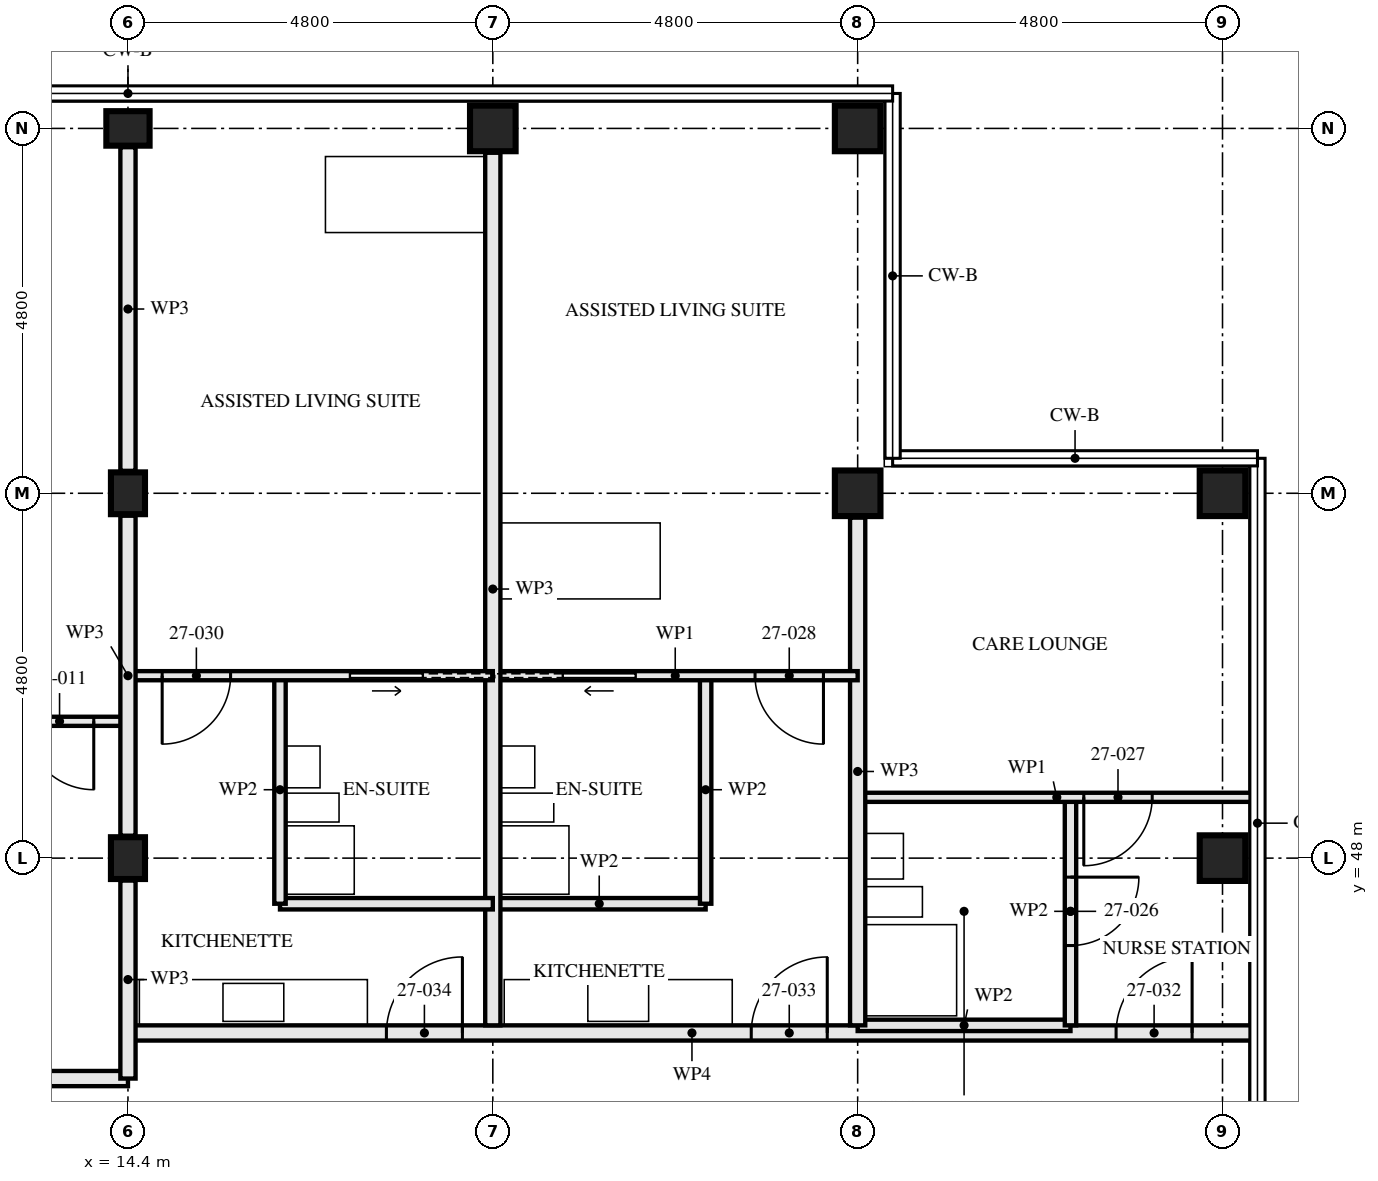
"""IFC4 building model, lengths in metres.
Left out: names, types, materials, properties, quantities, classifications, styles, units other than length and angle.
Written with IfcOpenShell. Run it as: python <this file> out.ifc"""

import sys

from ifc_helpers import new_model, si_unit, direction, frame, frame_2d, origin, origin_2d, place, context, subcontext, project, spatial, rectangle, hollow_rectangle, i_section, extrude, element, fill, save


model = new_model("IFC4")
c1 = context("Model", 3, precision=1e-05, world=origin(), true_north=direction((0.0, 1.0)))
c2 = subcontext(c1, "Body", "Model", "MODEL_VIEW")
j1 = project(units=[si_unit("LENGTHUNIT", "METRE"), si_unit("PLANEANGLEUNIT", "RADIAN")], contexts=[c1])
p1 = place(None, origin())
s1 = spatial("IfcSite", under=j1, at=p1, CompositionType="ELEMENT")
p2 = place(p1, origin())
s2 = spatial("IfcBuilding", under=s1, at=p2, CompositionType="ELEMENT")
p3 = place(p2, frame((0.0, 0.0, 101.5)))
s3 = spatial("IfcBuildingStorey", under=s2, at=p3, CompositionType="ELEMENT", Elevation=101.5)
for number, where, z_axis, x_axis in (
    (1, (14.4, 48.0, 0.0), (0.0, 0.0, 1.0), (1.0, 0.0, 0.0)),
    (2, (14.4, 52.8, 0.0), (0.0, 0.0, 1.0), (1.0, 0.0, 0.0)),
):
    element("IfcColumn", number, at=place(p3, frame(where, z_axis=z_axis, x_axis=x_axis)), inside=s3, PredefinedType="COLUMN", context=c2, shape_type="SweptSolid", body=[
        extrude(i_section(OverallWidth=0.448, OverallDepth=0.55, WebThickness=0.072, FlangeThickness=0.115, FilletRadius=0.015, at=origin_2d()), origin(), (0.0, 0.0, 1.0), 3.5),
    ])
p4 = place(p3, frame((14.4, 57.6, 0.0), z_axis=(0.0, 0.0, 1.0), x_axis=(0.0, 1.0, 0.0)))
e3 = element("IfcColumn", 3, at=p4, inside=s3, PredefinedType="COLUMN", context=c2, shape_type="SweptSolid", body=[
    extrude(i_section(OverallWidth=0.454, OverallDepth=0.569, WebThickness=0.078, FlangeThickness=0.125, FilletRadius=0.015, at=origin_2d()), origin(), (0.0, 0.0, 1.0), 3.5),
])
for number, where, z_axis, x_axis in (
    (4, (19.2, 57.6, 0.0), (0.0, 0.0, 1.0), (0.0, 1.0, 0.0)),
    (5, (24.0, 52.8, 0.0), (0.0, 0.0, 1.0), (0.0, 1.0, 0.0)),
    (6, (24.0, 57.6, 0.0), (0.0, 0.0, 1.0), (0.0, 1.0, 0.0)),
):
    element("IfcColumn", number, at=place(p3, frame(where, z_axis=z_axis, x_axis=x_axis)), inside=s3, PredefinedType="COLUMN", context=c2, shape_type="SweptSolid", body=[
        extrude(hollow_rectangle(XDim=0.6, YDim=0.6, WallThickness=0.06, at=origin_2d()), origin(), (0.0, 0.0, 1.0), 3.5),
    ])
p5 = place(p3, frame((28.8, 48.0, 0.0), z_axis=(0.0, 0.0, 1.0), x_axis=(1.0, 0.0, 0.0)))
e7 = element("IfcColumn", 7, at=p5, inside=s3, PredefinedType="COLUMN", context=c2, shape_type="SweptSolid", body=[
    extrude(hollow_rectangle(XDim=0.6, YDim=0.6, WallThickness=0.08, at=origin_2d()), origin(), (0.0, 0.0, 1.0), 3.5),
])
p6 = place(p3, frame((28.8, 52.8, 0.0), z_axis=(0.0, 0.0, 1.0), x_axis=(0.0, 1.0, 0.0)))
e8 = element("IfcColumn", 8, at=p6, inside=s3, PredefinedType="COLUMN", context=c2, shape_type="SweptSolid", body=[
    extrude(hollow_rectangle(XDim=0.6, YDim=0.6, WallThickness=0.06, at=origin_2d()), origin(), (0.0, 0.0, 1.0), 3.5),
])
p7 = place(p3, frame((14.4, 49.8, 0.0), z_axis=(0.0, 0.0, 1.0), x_axis=(-1.0, 0.0, 0.0)))
e9 = element("IfcWall", 9, at=p7, inside=s3, PredefinedType="PARTITIONING", context=c2, shape_type="SweptSolid", body=[
    extrude(rectangle(XDim=4.8, YDim=0.12, at=frame_2d((2.4, 0.0))), origin(), (0.0, 0.0, 1.0), 3.33),
])
p8 = place(p7, frame((0.45, 0.0, 0.0)))
e10 = element("IfcOpeningElement", 10, at=p8, cuts=e9, PredefinedType="OPENING", context=c2, shape_type="SweptSolid", body=[
    extrude(rectangle(XDim=0.9, YDim=2.1, at=frame_2d((0.45, 1.05))), frame((0.0, 0.071, 0.0), z_axis=(0.0, -1.0, 0.0), x_axis=(1.0, 0.0, 0.0)), (0.0, 0.0, 1.0), 0.141),
])
p9 = place(p3, frame((14.4, 45.1, 0.0), z_axis=(0.0, 0.0, 1.0), x_axis=(-1.0, 0.0, 0.0)))
e11 = element("IfcWall", 11, at=p9, inside=s3, PredefinedType="PARTITIONING", context=c2, shape_type="SweptSolid", body=[
    extrude(rectangle(XDim=9.6, YDim=0.2, at=frame_2d((4.8, 0.0))), origin(), (0.0, 0.0, 1.0), 3.33),
])
p10 = place(p9, frame((5.2, 0.0, 0.0)))
e12 = element("IfcOpeningElement", 12, at=p10, cuts=e11, PredefinedType="OPENING", context=c2, shape_type="SweptSolid", body=[
    extrude(rectangle(XDim=1.0, YDim=2.1, at=frame_2d((0.5, 1.05))), frame((0.0, 0.111, 0.0), z_axis=(0.0, -1.0, 0.0), x_axis=(1.0, 0.0, 0.0)), (0.0, 0.0, 1.0), 0.221),
])
p11 = place(p3, frame((26.8, 48.8, 0.0), z_axis=(0.0, 0.0, 1.0), x_axis=(0.0, -1.0, 0.0)))
e13 = element("IfcWall", 13, at=p11, inside=s3, PredefinedType="PARTITIONING", context=c2, shape_type="SweptSolid", body=[
    extrude(rectangle(XDim=3.0, YDim=0.15, at=frame_2d((1.5, 0.0))), origin(), (0.0, 0.0, 1.0), 2.55),
])
p12 = place(p11, frame((1.05, 0.0, 0.0)))
e14 = element("IfcOpeningElement", 14, at=p12, cuts=e13, PredefinedType="OPENING", context=c2, shape_type="SweptSolid", body=[
    extrude(rectangle(XDim=0.9, YDim=2.1, at=frame_2d((0.45, 1.05))), frame((0.0, 0.085, 0.0), z_axis=(0.0, -1.0, 0.0), x_axis=(1.0, 0.0, 0.0)), (0.0, 0.0, 1.0), 0.171),
])
p13 = place(p3, frame((26.8, 45.8, 0.0), z_axis=(0.0, 0.0, 1.0), x_axis=(-1.0, 0.0, 0.0)))
e15 = element("IfcWall", 15, at=p13, inside=s3, PredefinedType="PARTITIONING", context=c2, shape_type="SweptSolid", body=[
    extrude(rectangle(XDim=2.8, YDim=0.15, at=frame_2d((1.4, 0.0))), origin(), (0.0, 0.0, 1.0), 3.33),
])
p14 = place(p3, frame((29.24, 48.8, 0.0), z_axis=(0.0, 0.0, 1.0), x_axis=(-1.0, 0.0, 0.0)))
e16 = element("IfcWall", 16, at=p14, inside=s3, PredefinedType="PARTITIONING", context=c2, shape_type="SweptSolid", body=[
    extrude(rectangle(XDim=5.24, YDim=0.12, at=frame_2d((2.62, 0.0))), origin(), (0.0, 0.0, 1.0), 2.32),
])
p15 = place(p14, frame((1.365, 0.0, 0.0)))
e17 = element("IfcOpeningElement", 17, at=p15, cuts=e16, PredefinedType="OPENING", context=c2, shape_type="SweptSolid", body=[
    extrude(rectangle(XDim=0.9, YDim=2.1, at=frame_2d((0.45, 1.05))), frame((0.0, 0.071, 0.0), z_axis=(0.0, -1.0, 0.0), x_axis=(1.0, 0.0, 0.0)), (0.0, 0.0, 1.0), 0.141),
])
p16 = place(p3, frame((24.0, 52.48, 0.0), z_axis=(0.0, 0.0, 1.0), x_axis=(0.0, -1.0, 0.0)))
e18 = element("IfcWall", 18, at=p16, inside=s3, PredefinedType="PARTITIONING", context=c2, shape_type="SweptSolid", body=[
    extrude(rectangle(XDim=6.68, YDim=0.2, at=frame_2d((3.34, 0.0))), origin(), (0.0, 0.0, 1.0), 2.55),
])
p17 = place(p3, frame((22.0, 50.4, 0.0), z_axis=(0.0, 0.0, 1.0), x_axis=(0.0, -1.0, 0.0)))
e19 = element("IfcWall", 19, at=p17, inside=s3, PredefinedType="PARTITIONING", context=c2, shape_type="SweptSolid", body=[
    extrude(rectangle(XDim=3.0, YDim=0.15, at=frame_2d((1.5, 0.0))), origin(), (0.0, 0.0, 1.0), 2.55),
])
p18 = place(p3, frame((22.0, 47.4, 0.0), z_axis=(0.0, 0.0, 1.0), x_axis=(-1.0, 0.0, 0.0)))
e20 = element("IfcWall", 20, at=p18, inside=s3, PredefinedType="PARTITIONING", context=c2, shape_type="SweptSolid", body=[
    extrude(rectangle(XDim=2.8, YDim=0.15, at=frame_2d((1.4, 0.0))), origin(), (0.0, 0.0, 1.0), 3.33),
])
p19 = place(p3, frame((24.0, 50.4, 0.0), z_axis=(0.0, 0.0, 1.0), x_axis=(-1.0, 0.0, 0.0)))
e21 = element("IfcWall", 21, at=p19, inside=s3, PredefinedType="PARTITIONING", context=c2, shape_type="SweptSolid", body=[
    extrude(rectangle(XDim=4.8, YDim=0.12, at=frame_2d((2.4, 0.0))), origin(), (0.0, 0.0, 1.0), 3.33),
])
p20 = place(p19, frame((0.45, 0.0, 0.0)))
e22 = element("IfcOpeningElement", 22, at=p20, cuts=e21, PredefinedType="OPENING", context=c2, shape_type="SweptSolid", body=[
    extrude(rectangle(XDim=0.9, YDim=2.1, at=frame_2d((0.45, 1.05))), frame((0.0, 0.071, 0.0), z_axis=(0.0, -1.0, 0.0), x_axis=(1.0, 0.0, 0.0)), (0.0, 0.0, 1.0), 0.141),
])
p21 = place(p19, frame((2.925, 0.0, 0.0)))
e23 = element("IfcOpeningElement", 23, at=p21, cuts=e21, PredefinedType="OPENING", context=c2, shape_type="SweptSolid", body=[
    extrude(rectangle(XDim=0.95, YDim=2.1, at=frame_2d((0.475, 1.05))), frame((0.0, 0.071, 0.0), z_axis=(0.0, -1.0, 0.0), x_axis=(1.0, 0.0, 0.0)), (0.0, 0.0, 1.0), 0.141),
])
p22 = place(p3, frame((19.2, 57.28, 0.0), z_axis=(0.0, 0.0, 1.0), x_axis=(0.0, -1.0, 0.0)))
e24 = element("IfcWall", 24, at=p22, inside=s3, PredefinedType="PARTITIONING", context=c2, shape_type="SweptSolid", body=[
    extrude(rectangle(XDim=11.48, YDim=0.2, at=frame_2d((5.74, 0.0))), origin(), (0.0, 0.0, 1.0), 2.55),
])
p23 = place(p3, frame((16.4, 50.4, 0.0), z_axis=(0.0, 0.0, 1.0), x_axis=(0.0, -1.0, 0.0)))
e25 = element("IfcWall", 25, at=p23, inside=s3, PredefinedType="PARTITIONING", context=c2, shape_type="SweptSolid", body=[
    extrude(rectangle(XDim=3.0, YDim=0.15, at=frame_2d((1.5, 0.0))), origin(), (0.0, 0.0, 1.0), 2.55),
])
p24 = place(p3, frame((19.2, 47.4, 0.0), z_axis=(0.0, 0.0, 1.0), x_axis=(-1.0, 0.0, 0.0)))
e26 = element("IfcWall", 26, at=p24, inside=s3, PredefinedType="PARTITIONING", context=c2, shape_type="SweptSolid", body=[
    extrude(rectangle(XDim=2.8, YDim=0.15, at=frame_2d((1.4, 0.0))), origin(), (0.0, 0.0, 1.0), 3.33),
])
p25 = place(p3, frame((19.2, 50.4, 0.0), z_axis=(0.0, 0.0, 1.0), x_axis=(-1.0, 0.0, 0.0)))
e27 = element("IfcWall", 27, at=p25, inside=s3, PredefinedType="PARTITIONING", context=c2, shape_type="SweptSolid", body=[
    extrude(rectangle(XDim=4.8, YDim=0.12, at=frame_2d((2.4, 0.0))), origin(), (0.0, 0.0, 1.0), 3.33),
])
p26 = place(p25, frame((3.45, 0.0, 0.0)))
e28 = element("IfcOpeningElement", 28, at=p26, cuts=e27, PredefinedType="OPENING", context=c2, shape_type="SweptSolid", body=[
    extrude(rectangle(XDim=0.9, YDim=2.1, at=frame_2d((0.45, 1.05))), frame((0.0, 0.071, 0.0), z_axis=(0.0, -1.0, 0.0), x_axis=(1.0, 0.0, 0.0)), (0.0, 0.0, 1.0), 0.141),
])
p27 = place(p25, frame((0.925, 0.0, 0.0)))
e29 = element("IfcOpeningElement", 29, at=p27, cuts=e27, PredefinedType="OPENING", context=c2, shape_type="SweptSolid", body=[
    extrude(rectangle(XDim=0.95, YDim=2.1, at=frame_2d((0.475, 1.05))), frame((0.0, 0.071, 0.0), z_axis=(0.0, -1.0, 0.0), x_axis=(1.0, 0.0, 0.0)), (0.0, 0.0, 1.0), 0.141),
])
p28 = place(p3, frame((29.24, 45.7, 0.0), z_axis=(0.0, 0.0, 1.0), x_axis=(-1.0, 0.0, 0.0)))
e30 = element("IfcWall", 30, at=p28, inside=s3, PredefinedType="PARTITIONING", context=c2, shape_type="SweptSolid", body=[
    extrude(rectangle(XDim=14.84, YDim=0.2, at=frame_2d((7.42, 0.0))), origin(), (0.0, 0.0, 1.0), 2.32),
])
p29 = place(p28, frame((0.84, 0.0, 0.0)))
e31 = element("IfcOpeningElement", 31, at=p29, cuts=e30, PredefinedType="OPENING", context=c2, shape_type="SweptSolid", body=[
    extrude(rectangle(XDim=1.0, YDim=2.1, at=frame_2d((0.5, 1.05))), frame((0.0, 0.111, 0.0), z_axis=(0.0, -1.0, 0.0), x_axis=(1.0, 0.0, 0.0)), (0.0, 0.0, 1.0), 0.221),
])
p30 = place(p28, frame((5.64, 0.0, 0.0)))
e32 = element("IfcOpeningElement", 32, at=p30, cuts=e30, PredefinedType="OPENING", context=c2, shape_type="SweptSolid", body=[
    extrude(rectangle(XDim=1.0, YDim=2.1, at=frame_2d((0.5, 1.05))), frame((0.0, 0.111, 0.0), z_axis=(0.0, -1.0, 0.0), x_axis=(1.0, 0.0, 0.0)), (0.0, 0.0, 1.0), 0.221),
])
p31 = place(p28, frame((10.44, 0.0, 0.0)))
e33 = element("IfcOpeningElement", 33, at=p31, cuts=e30, PredefinedType="OPENING", context=c2, shape_type="SweptSolid", body=[
    extrude(rectangle(XDim=1.0, YDim=2.1, at=frame_2d((0.5, 1.05))), frame((0.0, 0.111, 0.0), z_axis=(0.0, -1.0, 0.0), x_axis=(1.0, 0.0, 0.0)), (0.0, 0.0, 1.0), 0.221),
])
p32 = place(p3, frame((14.4, 45.1, 0.0), z_axis=(0.0, 0.0, 1.0), x_axis=(0.0, 1.0, 0.0)))
e34 = element("IfcWall", 34, at=p32, inside=s3, PredefinedType="PARTITIONING", context=c2, shape_type="SweptSolid", body=[
    extrude(rectangle(XDim=2.605, YDim=0.2, at=frame_2d((1.302, 0.0))), origin(), (0.0, 0.0, 1.0), 2.32),
])
p33 = place(p3, frame((14.4, 48.295, 0.0), z_axis=(0.0, 0.0, 1.0), x_axis=(0.0, 1.0, 0.0)))
e35 = element("IfcWall", 35, at=p33, inside=s3, PredefinedType="PARTITIONING", context=c2, shape_type="SweptSolid", body=[
    extrude(rectangle(XDim=4.21, YDim=0.2, at=frame_2d((2.105, 0.0))), origin(), (0.0, 0.0, 1.0), 2.32),
])
p34 = place(p3, frame((14.4, 53.095, 0.0), z_axis=(0.0, 0.0, 1.0), x_axis=(0.0, 1.0, 0.0)))
e36 = element("IfcWall", 36, at=p34, inside=s3, PredefinedType="PARTITIONING", context=c2, shape_type="SweptSolid", body=[
    extrude(rectangle(XDim=4.258, YDim=0.2, at=frame_2d((2.129, 0.0))), origin(), (0.0, 0.0, 1.0), 2.32),
])
p35 = place(p8, origin())
e37 = element("IfcDoor", 37, at=p35, inside=s3, OperationType="SINGLE_SWING_RIGHT", PredefinedType="DOOR", context=c2, shape_type="SweptSolid", body=[
    extrude(rectangle(XDim=0.9, YDim=2.1, at=frame_2d((0.45, 1.05))), frame((0.0, 0.022, 0.0), z_axis=(0.0, -1.0, 0.0), x_axis=(1.0, 0.0, 0.0)), (0.0, 0.0, 1.0), 0.044),
])
fill(e10, e37)
p36 = place(p12, origin())
e38 = element("IfcDoor", 38, at=p36, inside=s3, OperationType="SINGLE_SWING_RIGHT", PredefinedType="DOOR", context=c2, shape_type="SweptSolid", body=[
    extrude(rectangle(XDim=0.9, YDim=2.1, at=frame_2d((0.45, 1.05))), frame((0.0, 0.022, 0.0), z_axis=(0.0, -1.0, 0.0), x_axis=(1.0, 0.0, 0.0)), (0.0, 0.0, 1.0), 0.044),
])
fill(e14, e38)
p37 = place(p15, origin())
e39 = element("IfcDoor", 39, at=p37, inside=s3, OperationType="SINGLE_SWING_LEFT", PredefinedType="DOOR", context=c2, shape_type="SweptSolid", body=[
    extrude(rectangle(XDim=0.9, YDim=2.1, at=frame_2d((0.45, 1.05))), frame((0.0, 0.022, 0.0), z_axis=(0.0, -1.0, 0.0), x_axis=(1.0, 0.0, 0.0)), (0.0, 0.0, 1.0), 0.044),
])
fill(e17, e39)
p38 = place(p20, origin())
e40 = element("IfcDoor", 40, at=p38, inside=s3, OperationType="SINGLE_SWING_RIGHT", PredefinedType="DOOR", context=c2, shape_type="SweptSolid", body=[
    extrude(rectangle(XDim=0.9, YDim=2.1, at=frame_2d((0.45, 1.05))), frame((0.0, 0.022, 0.0), z_axis=(0.0, -1.0, 0.0), x_axis=(1.0, 0.0, 0.0)), (0.0, 0.0, 1.0), 0.044),
])
fill(e22, e40)
p39 = place(p21, origin())
e41 = element("IfcDoor", 41, at=p39, inside=s3, OperationType="SLIDING_TO_LEFT", PredefinedType="DOOR", context=c2, shape_type="SweptSolid", body=[
    extrude(rectangle(XDim=0.95, YDim=2.1, at=frame_2d((0.475, 1.05))), frame((0.0, 0.022, 0.0), z_axis=(0.0, -1.0, 0.0), x_axis=(1.0, 0.0, 0.0)), (0.0, 0.0, 1.0), 0.044),
])
fill(e23, e41)
p40 = place(p26, origin())
e42 = element("IfcDoor", 42, at=p40, inside=s3, OperationType="SINGLE_SWING_LEFT", PredefinedType="DOOR", context=c2, shape_type="SweptSolid", body=[
    extrude(rectangle(XDim=0.9, YDim=2.1, at=frame_2d((0.45, 1.05))), frame((0.0, 0.022, 0.0), z_axis=(0.0, -1.0, 0.0), x_axis=(1.0, 0.0, 0.0)), (0.0, 0.0, 1.0), 0.044),
])
fill(e28, e42)
p41 = place(p27, origin())
e43 = element("IfcDoor", 43, at=p41, inside=s3, OperationType="SLIDING_TO_RIGHT", PredefinedType="DOOR", context=c2, shape_type="SweptSolid", body=[
    extrude(rectangle(XDim=0.95, YDim=2.1, at=frame_2d((0.475, 1.05))), frame((0.0, 0.022, 0.0), z_axis=(0.0, -1.0, 0.0), x_axis=(1.0, 0.0, 0.0)), (0.0, 0.0, 1.0), 0.044),
])
fill(e29, e43)
p42 = place(p29, frame((1.0, 0.0, 0.0), z_axis=(0.0, 0.0, 1.0), x_axis=(-1.0, 0.0, 0.0)))
e44 = element("IfcDoor", 44, at=p42, inside=s3, OperationType="SINGLE_SWING_LEFT", PredefinedType="DOOR", context=c2, shape_type="SweptSolid", body=[
    extrude(rectangle(XDim=1.0, YDim=2.1, at=frame_2d((0.5, 1.05))), frame((0.0, 0.027, 0.0), z_axis=(0.0, -1.0, 0.0), x_axis=(1.0, 0.0, 0.0)), (0.0, 0.0, 1.0), 0.054),
])
fill(e31, e44)
p43 = place(p30, frame((1.0, 0.0, 0.0), z_axis=(0.0, 0.0, 1.0), x_axis=(-1.0, 0.0, 0.0)))
e45 = element("IfcDoor", 45, at=p43, inside=s3, OperationType="SINGLE_SWING_LEFT", PredefinedType="DOOR", context=c2, shape_type="SweptSolid", body=[
    extrude(rectangle(XDim=1.0, YDim=2.1, at=frame_2d((0.5, 1.05))), frame((0.0, 0.027, 0.0), z_axis=(0.0, -1.0, 0.0), x_axis=(1.0, 0.0, 0.0)), (0.0, 0.0, 1.0), 0.054),
])
fill(e32, e45)
p44 = place(p31, frame((1.0, 0.0, 0.0), z_axis=(0.0, 0.0, 1.0), x_axis=(-1.0, 0.0, 0.0)))
e46 = element("IfcDoor", 46, at=p44, inside=s3, OperationType="SINGLE_SWING_LEFT", PredefinedType="DOOR", context=c2, shape_type="SweptSolid", body=[
    extrude(rectangle(XDim=1.0, YDim=2.1, at=frame_2d((0.5, 1.05))), frame((0.0, 0.027, 0.0), z_axis=(0.0, -1.0, 0.0), x_axis=(1.0, 0.0, 0.0)), (0.0, 0.0, 1.0), 0.054),
])
fill(e33, e46)
save(model, sys.argv[1])
